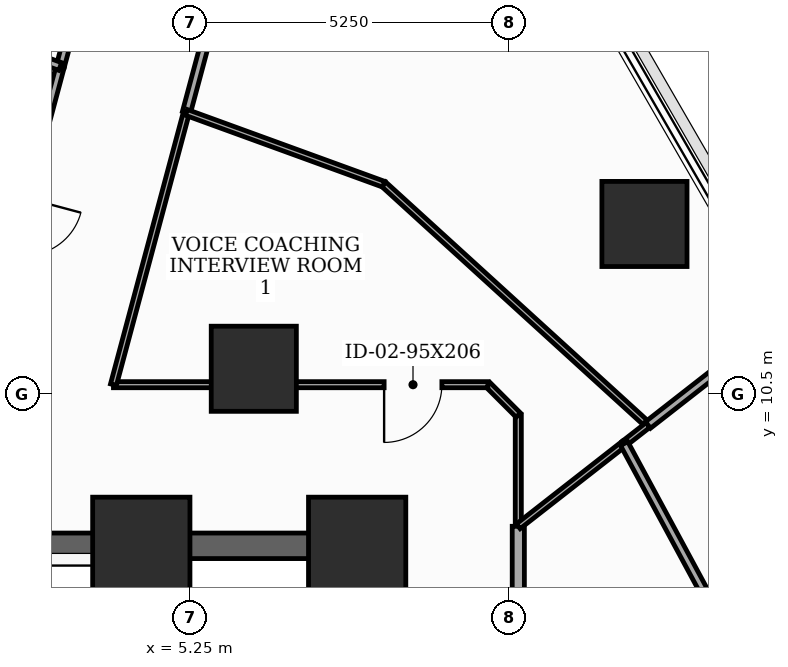
"""IFC4 building model, lengths in metres.
Left out: names, types, materials, properties, quantities, classifications, styles, units other than length and angle.
Written with IfcOpenShell. Run it as: python <this file> out.ifc"""

import sys

from ifc_helpers import new_model, si_unit, direction, frame, frame_2d, origin, origin_2d, place, context, subcontext, project, spatial, rectangle, extrude, element, fill, save


model = new_model("IFC4")
c1 = context("Model", 3, precision=1e-05, world=origin(), true_north=direction((0.0, 1.0)))
c2 = subcontext(c1, "Body", "Model", "MODEL_VIEW")
j1 = project(units=[si_unit("LENGTHUNIT", "METRE"), si_unit("PLANEANGLEUNIT", "RADIAN")], contexts=[c1])
p1 = place(None, origin())
s1 = spatial("IfcSite", under=j1, at=p1, CompositionType="ELEMENT")
p2 = place(p1, origin())
s2 = spatial("IfcBuilding", under=s1, at=p2, CompositionType="ELEMENT")
p3 = place(p2, frame((0.0, 0.0, 51.9)))
s3 = spatial("IfcBuildingStorey", under=s2, at=p3, CompositionType="ELEMENT", Elevation=51.9)
for number, where, z_axis, x_axis in (
    (1, (8.0, 8.0, 0.0), (0.0, 0.0, 1.0), (1.0, 0.0, 0.0)),
    (2, (4.45, 8.0, 0.0), (0.0, 0.0, 1.0), (1.0, 0.0, 0.0)),
):
    element("IfcColumn", number, at=place(p3, frame(where, z_axis=z_axis, x_axis=x_axis)), inside=s3, PredefinedType="COLUMN", context=c2, shape_type="SweptSolid", body=[
        extrude(rectangle(XDim=1.6, YDim=1.6, at=origin_2d()), origin(), (0.0, 0.0, 1.0), 3.7),
    ])
for number, where, z_axis, x_axis in (
    (3, (6.3, 10.912, 0.0), (0.0, 0.0, 1.0), (1.0, 0.0, 0.0)),
    (4, (12.725, 13.293, 0.0), (0.0, 0.0, 1.0), (1.0, 0.0, 0.0)),
):
    element("IfcColumn", number, at=place(p3, frame(where, z_axis=z_axis, x_axis=x_axis)), inside=s3, PredefinedType="COLUMN", context=c2, shape_type="SweptSolid", body=[
        extrude(rectangle(XDim=1.4, YDim=1.4, at=origin_2d()), origin(), (0.0, 0.0, 1.0), 3.7),
    ])
p4 = place(p3, frame((8.0, -8.0, 0.0), z_axis=(0.0, 0.0, 1.0), x_axis=(0.0, 1.0, 0.0)))
e5 = element("IfcWall", 5, at=p4, inside=s3, PredefinedType="SHEAR", context=c2, shape_type="SweptSolid", body=[
    extrude(rectangle(XDim=16.0, YDim=0.42, at=frame_2d((8.0, 0.0))), origin(), (0.0, 0.0, 1.0), 3.5),
])
p5 = place(p4, frame((9.6, 0.0, 0.0)))
e6 = element("IfcOpeningElement", 6, at=p5, cuts=e5, PredefinedType="OPENING", context=c2, shape_type="SweptSolid", body=[
    extrude(rectangle(XDim=1.05, YDim=2.15, at=frame_2d((0.525, 1.075))), frame((0.0, 0.22, 0.0), z_axis=(0.0, -1.0, 0.0), x_axis=(1.0, 0.0, 0.0)), (0.0, 0.0, 1.0), 0.44),
])
p6 = place(p4, frame((14.148, 0.0, 0.0)))
e7 = element("IfcOpeningElement", 7, at=p6, cuts=e5, PredefinedType="OPENING", context=c2, shape_type="SweptSolid", body=[
    extrude(rectangle(XDim=0.85, YDim=2.02, at=frame_2d((0.425, 1.01))), frame((0.0, 0.22, 0.0), z_axis=(0.0, -1.0, 0.0), x_axis=(1.0, 0.0, 0.0)), (0.0, 0.0, 1.0), 0.44),
])
p7 = place(p3, frame((-8.0, 8.0, 0.0), z_axis=(0.0, 0.0, 1.0), x_axis=(1.0, 0.0, 0.0)))
e8 = element("IfcWall", 8, at=p7, inside=s3, PredefinedType="SHEAR", context=c2, shape_type="SweptSolid", body=[
    extrude(rectangle(XDim=16.0, YDim=0.42, at=frame_2d((8.0, 0.0))), origin(), (0.0, 0.0, 1.0), 3.5),
])
p8 = place(p7, frame((7.1, 0.0, 0.0)))
e9 = element("IfcOpeningElement", 9, at=p8, cuts=e8, PredefinedType="OPENING", context=c2, shape_type="SweptSolid", body=[
    extrude(rectangle(XDim=1.8, YDim=2.15, at=frame_2d((0.9, 1.075))), frame((0.0, 0.22, 0.0), z_axis=(0.0, -1.0, 0.0), x_axis=(1.0, 0.0, 0.0)), (0.0, 0.0, 1.0), 0.44),
])
p9 = place(p3, frame((4.45, -7.79, 0.0), z_axis=(0.0, 0.0, 1.0), x_axis=(0.0, 1.0, 0.0)))
e10 = element("IfcWall", 10, at=p9, inside=s3, PredefinedType="SHEAR", context=c2, shape_type="SweptSolid", body=[
    extrude(rectangle(XDim=15.58, YDim=0.3, at=frame_2d((7.79, 0.0))), origin(), (0.0, 0.0, 1.0), 3.5),
])
p10 = place(p3, frame((10.65, 8.321, 0.0), z_axis=(0.0, 0.0, 1.0), x_axis=(0.0, 1.0, 0.0)))
e11 = element("IfcWall", 11, at=p10, inside=s3, PredefinedType="MOVABLE", context=c2, shape_type="SweptSolid", body=[
    extrude(rectangle(XDim=1.829, YDim=0.1, at=frame_2d((0.915, 0.0))), origin(), (0.0, 0.0, 1.0), 3.5),
])
p11 = place(p3, frame((10.65, 10.15, 0.0), z_axis=(0.0, 0.0, 1.0), x_axis=(-0.707106781187, 0.707106781187, 0.0)))
e12 = element("IfcWall", 12, at=p11, inside=s3, PredefinedType="MOVABLE", context=c2, shape_type="SweptSolid", body=[
    extrude(rectangle(XDim=0.707, YDim=0.1, at=frame_2d((0.354, 0.0))), origin(), (0.0, 0.0, 1.0), 3.5),
])
p12 = place(p3, frame((10.15, 10.65, 0.0), z_axis=(0.0, 0.0, 1.0), x_axis=(-1.0, 0.0, 0.0)))
e13 = element("IfcWall", 13, at=p12, inside=s3, PredefinedType="MOVABLE", context=c2, shape_type="SweptSolid", body=[
    extrude(rectangle(XDim=6.158, YDim=0.1, at=frame_2d((3.079, 0.0))), origin(), (0.0, 0.0, 1.0), 2.085),
])
p13 = place(p12, frame((0.757, 0.0, 0.0)))
e14 = element("IfcOpeningElement", 14, at=p13, cuts=e13, PredefinedType="OPENING", context=c2, shape_type="SweptSolid", body=[
    extrude(rectangle(XDim=0.95, YDim=2.035, at=frame_2d((0.475, 1.018))), frame((0.0, 0.06, 0.0), z_axis=(0.0, -1.0, 0.0), x_axis=(1.0, 0.0, 0.0)), (0.0, 0.0, 1.0), 0.12),
])
p14 = place(p3, frame((3.992, 10.65, 0.0), z_axis=(0.0, 0.0, 1.0), x_axis=(0.258832601786, 0.965922193685, 0.0)))
e15 = element("IfcWall", 15, at=p14, inside=s3, PredefinedType="MOVABLE", context=c2, shape_type="SweptSolid", body=[
    extrude(rectangle(XDim=4.636, YDim=0.1, at=frame_2d((2.318, 0.0))), origin(), (0.0, 0.0, 1.0), 2.085),
])
p15 = place(p3, frame((5.192, 15.128, 0.0), z_axis=(0.0, 0.0, 1.0), x_axis=(0.258929564275, 0.965896205989, 0.0)))
e16 = element("IfcWall", 16, at=p15, inside=s3, PredefinedType="PARTITIONING", context=c2, shape_type="SweptSolid", body=[
    extrude(rectangle(XDim=6.644, YDim=0.135, at=frame_2d((3.322, 0.0))), origin(), (0.0, 0.0, 1.0), 2.085),
])
p16 = place(p15, frame((2.847, 0.0, 0.0)))
e17 = element("IfcOpeningElement", 17, at=p16, cuts=e16, PredefinedType="OPENING", context=c2, shape_type="SweptSolid", body=[
    extrude(rectangle(XDim=0.95, YDim=2.035, at=frame_2d((0.475, 1.018))), frame((0.0, 0.077, 0.0), z_axis=(0.0, -1.0, 0.0), x_axis=(1.0, 0.0, 0.0)), (0.0, 0.0, 1.0), 0.155),
])
p17 = place(p3, frame((4.787, 22.115, 0.0), z_axis=(0.0, 0.0, 1.0), x_axis=(-0.25886596283, -0.965913253501, 0.0)))
e18 = element("IfcWall", 18, at=p17, inside=s3, PredefinedType="PARTITIONING", context=c2, shape_type="SweptSolid", body=[
    extrude(rectangle(XDim=6.452, YDim=0.135, at=frame_2d((3.226, 0.0))), origin(), (0.0, 0.0, 1.0), 2.085),
])
p18 = place(p3, frame((3.117, 15.883, 0.0), z_axis=(0.0, 0.0, 1.0), x_axis=(-0.258756357845, -0.965942621109, 0.0)))
e19 = element("IfcWall", 19, at=p18, inside=s3, PredefinedType="PARTITIONING", context=c2, shape_type="SweptSolid", body=[
    extrude(rectangle(XDim=5.418, YDim=0.135, at=frame_2d((2.709, 0.0))), origin(), (0.0, 0.0, 1.0), 2.785),
])
p19 = place(p18, frame((2.234, 0.0, 0.0)))
e20 = element("IfcOpeningElement", 20, at=p19, cuts=e19, PredefinedType="OPENING", context=c2, shape_type="SweptSolid", body=[
    extrude(rectangle(XDim=0.95, YDim=2.1, at=frame_2d((0.475, 1.05))), frame((0.0, 0.077, 0.0), z_axis=(0.0, -1.0, 0.0), x_axis=(1.0, 0.0, 0.0)), (0.0, 0.0, 1.0), 0.155),
])
p20 = place(p3, frame((10.65, -1.715, 0.0), z_axis=(0.0, 0.0, 1.0), x_axis=(0.0, 1.0, 0.0)))
e21 = element("IfcWall", 21, at=p20, inside=s3, PredefinedType="SOLIDWALL", context=c2, shape_type="SweptSolid", body=[
    extrude(rectangle(XDim=10.036, YDim=0.2, at=frame_2d((5.018, 0.0))), origin(), (0.0, 0.0, 1.0), 2.785),
])
p21 = place(p20, frame((4.543, 0.0, 0.0)))
e22 = element("IfcOpeningElement", 22, at=p21, cuts=e21, PredefinedType="OPENING", context=c2, shape_type="SweptSolid", body=[
    extrude(rectangle(XDim=0.95, YDim=2.1, at=frame_2d((0.475, 1.05))), frame((0.0, 0.11, 0.0), z_axis=(0.0, -1.0, 0.0), x_axis=(1.0, 0.0, 0.0)), (0.0, 0.0, 1.0), 0.22),
])
p22 = place(p3, frame((12.783, 9.987, 0.0), z_axis=(0.0, 0.0, 1.0), x_axis=(-0.739244565006, 0.6734370595, 0.0)))
e23 = element("IfcWall", 23, at=p22, inside=s3, PredefinedType="MOVABLE", context=c2, shape_type="SweptSolid", body=[
    extrude(rectangle(XDim=5.88, YDim=0.1, at=frame_2d((2.94, 0.0))), origin(), (0.0, 0.0, 1.0), 2.085),
])
p23 = place(p3, frame((8.436, 13.947, 0.0), z_axis=(0.0, 0.0, 1.0), x_axis=(-0.939679812385, 0.342055332067, 0.0)))
e24 = element("IfcWall", 24, at=p23, inside=s3, PredefinedType="MOVABLE", context=c2, shape_type="SweptSolid", body=[
    extrude(rectangle(XDim=3.452, YDim=0.1, at=frame_2d((1.726, 0.0))), origin(), (0.0, 0.0, 1.0), 2.085),
])
p24 = place(p3, frame((12.391, 9.681, 0.0), z_axis=(0.0, 0.0, 1.0), x_axis=(0.788002042991, 0.615672624243, 0.0)))
e25 = element("IfcWall", 25, at=p24, inside=s3, PredefinedType="MOVABLE", context=c2, shape_type="SweptSolid", body=[
    extrude(rectangle(XDim=0.497, YDim=0.1, at=frame_2d((0.249, 0.0))), origin(), (0.0, 0.0, 1.0), 3.5),
])
p25 = place(p3, frame((10.65, 8.321, 0.0), z_axis=(0.0, 0.0, 1.0), x_axis=(0.788124883644, 0.615515367624, 0.0)))
e26 = element("IfcWall", 26, at=p25, inside=s3, PredefinedType="MOVABLE", context=c2, shape_type="SweptSolid", body=[
    extrude(rectangle(XDim=2.209, YDim=0.1, at=frame_2d((1.104, 0.0))), origin(), (0.0, 0.0, 1.0), 3.085),
])
p26 = place(p3, frame((12.783, 9.987, 0.0), z_axis=(0.0, 0.0, 1.0), x_axis=(0.788064029995, 0.615593278576, 0.0)))
e27 = element("IfcWall", 27, at=p26, inside=s3, PredefinedType="PARTITIONING", context=c2, shape_type="SweptSolid", body=[
    extrude(rectangle(XDim=2.8, YDim=0.135, at=frame_2d((1.4, 0.0))), origin(), (0.0, 0.0, 1.0), 2.085),
])
p27 = place(p3, frame((2.503, 16.107, 0.0), z_axis=(0.0, 0.0, 1.0), x_axis=(0.93949859082, -0.342552766514, 0.0)))
e28 = element("IfcWall", 28, at=p27, inside=s3, PredefinedType="PARTITIONING", context=c2, shape_type="SweptSolid", body=[
    extrude(rectangle(XDim=0.654, YDim=0.135, at=frame_2d((0.327, 0.0))), origin(), (0.0, 0.0, 1.0), 3.5),
])
p28 = place(p3, frame((12.391, 9.681, 0.0), z_axis=(0.0, 0.0, 1.0), x_axis=(0.475181539821, -0.879887779329, 0.0)))
e29 = element("IfcWall", 29, at=p28, inside=s3, PredefinedType="PARTITIONING", context=c2, shape_type="SweptSolid", body=[
    extrude(rectangle(XDim=5.678, YDim=0.135, at=frame_2d((2.839, 0.0))), origin(), (0.0, 0.0, 1.0), 2.085),
])
p29 = place(p13, origin())
e30 = element("IfcDoor", 30, at=p29, inside=s3, OperationType="SINGLE_SWING_RIGHT", PredefinedType="DOOR", context=c2, shape_type="SweptSolid", body=[
    extrude(rectangle(XDim=0.95, YDim=2.035, at=frame_2d((0.475, 1.018))), frame((0.0, 0.025, 0.0), z_axis=(0.0, -1.0, 0.0), x_axis=(1.0, 0.0, 0.0)), (0.0, 0.0, 1.0), 0.05),
])
fill(e14, e30)
save(model, sys.argv[1])
